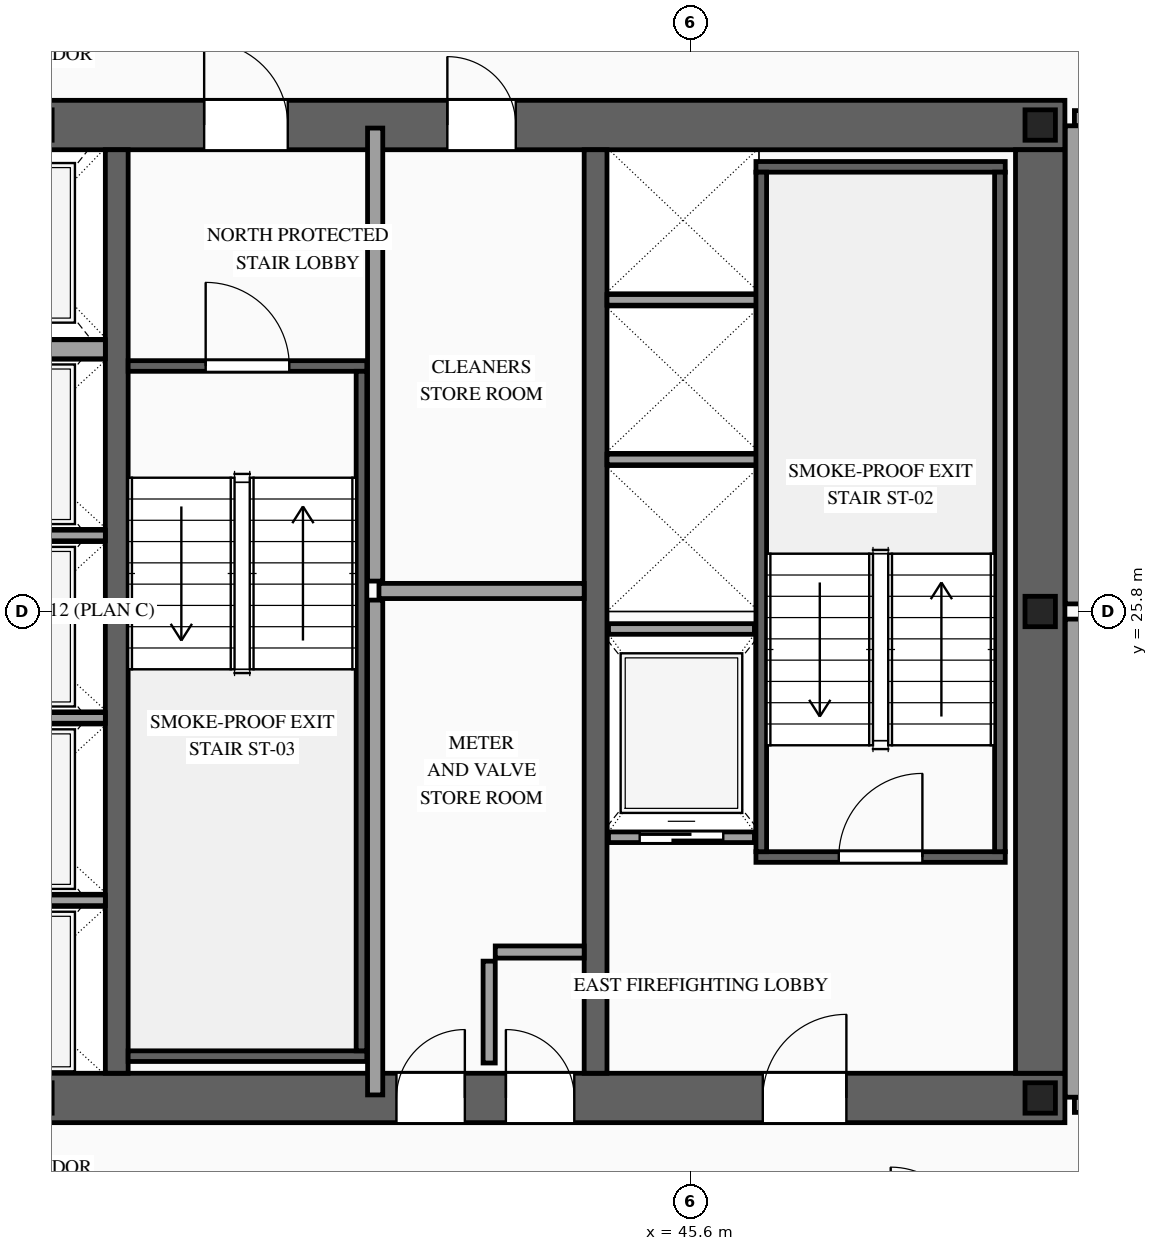
"""IFC4 building model, lengths in metres.
Left out: names, types, materials, properties, quantities, classifications, styles, units other than length and angle.
Written with IfcOpenShell. Run it as: python <this file> out.ifc"""

import sys

from ifc_helpers import new_model, si_unit, direction, frame, frame_2d, origin, origin_2d, place, context, subcontext, project, spatial, rectangle, i_section, extrude, source, transform, mapped, element, fill, save


model = new_model("IFC4")
c1 = context("Model", 3, precision=1e-05, world=origin(), true_north=direction((0.0, 1.0)))
c2 = subcontext(c1, "Body", "Model", "MODEL_VIEW")
j1 = project(units=[si_unit("LENGTHUNIT", "METRE"), si_unit("PLANEANGLEUNIT", "RADIAN")], contexts=[c1])
p1 = place(None, origin())
s1 = spatial("IfcSite", under=j1, at=p1, CompositionType="ELEMENT")
p2 = place(p1, origin())
s2 = spatial("IfcBuilding", under=s1, at=p2, CompositionType="ELEMENT")
p3 = place(p2, frame((0.0, 0.0, 212.5)))
s3 = spatial("IfcBuildingStorey", under=s2, at=p3, CompositionType="ELEMENT", Elevation=212.5)
p4 = place(p3, frame((23.475, 19.4, 0.0), z_axis=(0.0, 0.0, 1.0), x_axis=(1.0, 0.0, 0.0)))
e1 = element("IfcWall", 1, at=p4, inside=s3, PredefinedType="SHEAR", context=c2, shape_type="SweptSolid", body=[
    extrude(rectangle(XDim=27.05, YDim=0.65, at=frame_2d((13.525, 0.0))), origin(), (0.0, 0.0, 1.0), 3.5),
])
p5 = place(p4, frame((1.975, 0.0, 0.0)))
e2 = element("IfcOpeningElement", 2, at=p5, cuts=e1, PredefinedType="OPENING", context=c2, shape_type="SweptSolid", body=[
    extrude(rectangle(XDim=1.1, YDim=2.2, at=frame_2d((0.55, 1.1))), frame((0.0, 0.34, 0.0), z_axis=(0.0, -1.0, 0.0), x_axis=(1.0, 0.0, 0.0)), (0.0, 0.0, 1.0), 0.68),
])
p6 = place(p4, frame((9.875, 0.0, 0.0)))
e3 = element("IfcOpeningElement", 3, at=p6, cuts=e1, PredefinedType="OPENING", context=c2, shape_type="SweptSolid", body=[
    extrude(rectangle(XDim=1.1, YDim=2.2, at=frame_2d((0.55, 1.1))), frame((0.0, 0.34, 0.0), z_axis=(0.0, -1.0, 0.0), x_axis=(1.0, 0.0, 0.0)), (0.0, 0.0, 1.0), 0.68),
])
p7 = place(p4, frame((23.075, 0.0, 0.0)))
e4 = element("IfcOpeningElement", 4, at=p7, cuts=e1, PredefinedType="OPENING", context=c2, shape_type="SweptSolid", body=[
    extrude(rectangle(XDim=1.1, YDim=2.2, at=frame_2d((0.55, 1.1))), frame((0.0, 0.34, 0.0), z_axis=(0.0, -1.0, 0.0), x_axis=(1.0, 0.0, 0.0)), (0.0, 0.0, 1.0), 0.68),
])
p8 = place(p4, frame((19.695, 0.0, 0.0)))
e5 = element("IfcOpeningElement", 5, at=p8, cuts=e1, PredefinedType="OPENING", context=c2, shape_type="SweptSolid", body=[
    extrude(rectangle(XDim=0.9, YDim=2.15, at=frame_2d((0.45, 1.075))), frame((0.0, 0.34, 0.0), z_axis=(0.0, -1.0, 0.0), x_axis=(1.0, 0.0, 0.0)), (0.0, 0.0, 1.0), 0.68),
])
p9 = place(p4, frame((18.255, 0.0, 0.0)))
e6 = element("IfcOpeningElement", 6, at=p9, cuts=e1, PredefinedType="OPENING", context=c2, shape_type="SweptSolid", body=[
    extrude(rectangle(XDim=0.9, YDim=2.15, at=frame_2d((0.45, 1.075))), frame((0.0, 0.34, 0.0), z_axis=(0.0, -1.0, 0.0), x_axis=(1.0, 0.0, 0.0)), (0.0, 0.0, 1.0), 0.68),
])
p10 = place(p3, frame((23.475, 32.2, 0.0), z_axis=(0.0, 0.0, 1.0), x_axis=(1.0, 0.0, 0.0)))
e7 = element("IfcWall", 7, at=p10, inside=s3, PredefinedType="SHEAR", context=c2, shape_type="SweptSolid", body=[
    extrude(rectangle(XDim=27.05, YDim=0.65, at=frame_2d((13.525, 0.0))), origin(), (0.0, 0.0, 1.0), 3.5),
])
p11 = place(p10, frame((4.595, 0.0, 0.0)))
e8 = element("IfcOpeningElement", 8, at=p11, cuts=e7, PredefinedType="OPENING", context=c2, shape_type="SweptSolid", body=[
    extrude(rectangle(XDim=0.9, YDim=2.15, at=frame_2d((0.45, 1.075))), frame((0.0, 0.34, 0.0), z_axis=(0.0, -1.0, 0.0), x_axis=(1.0, 0.0, 0.0)), (0.0, 0.0, 1.0), 0.68),
])
p12 = place(p10, frame((9.875, 0.0, 0.0)))
e9 = element("IfcOpeningElement", 9, at=p12, cuts=e7, PredefinedType="OPENING", context=c2, shape_type="SweptSolid", body=[
    extrude(rectangle(XDim=1.1, YDim=2.2, at=frame_2d((0.55, 1.1))), frame((0.0, 0.34, 0.0), z_axis=(0.0, -1.0, 0.0), x_axis=(1.0, 0.0, 0.0)), (0.0, 0.0, 1.0), 0.68),
])
p13 = place(p10, frame((15.725, 0.0, 0.0)))
e10 = element("IfcOpeningElement", 10, at=p13, cuts=e7, PredefinedType="OPENING", context=c2, shape_type="SweptSolid", body=[
    extrude(rectangle(XDim=1.1, YDim=2.2, at=frame_2d((0.55, 1.1))), frame((0.0, 0.34, 0.0), z_axis=(0.0, -1.0, 0.0), x_axis=(1.0, 0.0, 0.0)), (0.0, 0.0, 1.0), 0.68),
])
p14 = place(p10, frame((18.925, 0.0, 0.0)))
e11 = element("IfcOpeningElement", 11, at=p14, cuts=e7, PredefinedType="OPENING", context=c2, shape_type="SweptSolid", body=[
    extrude(rectangle(XDim=0.9, YDim=2.15, at=frame_2d((0.45, 1.075))), frame((0.0, 0.34, 0.0), z_axis=(0.0, -1.0, 0.0), x_axis=(1.0, 0.0, 0.0)), (0.0, 0.0, 1.0), 0.68),
])
m1 = source(origin(), c2, "Body", "SweptSolid", [
    extrude(rectangle(XDim=12.15, YDim=0.65, at=frame_2d((6.075, 0.0))), origin(), (0.0, 0.0, 1.0), 3.5),
])
p15 = place(p3, frame((50.2, 19.725, 0.0), z_axis=(0.0, 0.0, 1.0), x_axis=(0.0, 1.0, 0.0)))
e12 = element("IfcWall", 12, at=p15, inside=s3, PredefinedType="SHEAR", context=c2, shape_type="MappedRepresentation", body=[
    mapped(m1, transform((0.0, 0.0, 0.0), scale=1.0)),
])
m2 = source(origin(), c2, "Body", "SweptSolid", [
    extrude(rectangle(XDim=12.15, YDim=0.3, at=frame_2d((6.075, 0.0))), origin(), (0.0, 0.0, 1.0), 3.5),
])
for number, where, z_axis, x_axis in (
    (13, (38.05, 19.725, 0.0), (0.0, 0.0, 1.0), (0.0, 1.0, 0.0)),
    (14, (44.35, 19.725, 0.0), (0.0, 0.0, 1.0), (0.0, 1.0, 0.0)),
):
    element("IfcWall", number, at=place(p3, frame(where, z_axis=z_axis, x_axis=x_axis)), inside=s3, PredefinedType="SOLIDWALL", context=c2, shape_type="MappedRepresentation", body=[
        mapped(m2, transform((0.0, 0.0, 0.0), scale=1.0)),
    ])
m3 = source(origin(), c2, "Body", "SweptSolid", [
    extrude(i_section(OverallWidth=0.4, OverallDepth=0.4, WebThickness=0.013, FlangeThickness=0.021, at=origin_2d()), origin(), (0.0, 0.0, 1.0), 3.5),
])
for number, where, z_axis, x_axis in (
    (15, (50.2, 19.4, 0.0), (0.0, 0.0, 1.0), (1.0, 0.0, 0.0)),
    (16, (50.2, 25.8, 0.0), (0.0, 0.0, 1.0), (1.0, 0.0, 0.0)),
    (17, (50.2, 32.2, 0.0), (0.0, 0.0, 1.0), (1.0, 0.0, 0.0)),
):
    element("IfcColumn", number, at=place(p3, frame(where, z_axis=z_axis, x_axis=x_axis)), inside=s3, PredefinedType="COLUMN", context=c2, shape_type="MappedRepresentation", body=[
        mapped(m3, transform((0.0, 0.0, 0.0), scale=1.0)),
    ])
p16 = place(p3, frame((44.52, 22.83, 0.0), z_axis=(0.0, 0.0, 1.0), x_axis=(1.0, 0.0, 0.0)))
e18 = element("IfcWall", 18, at=p16, inside=s3, PredefinedType="SOLIDWALL", context=c2, shape_type="SweptSolid", body=[
    extrude(rectangle(XDim=1.92, YDim=0.14, at=frame_2d((0.96, 0.0))), origin(), (0.0, 0.0, 1.0), 3.28),
])
p17 = place(p16, frame((0.41, 0.0, 0.0)))
e19 = element("IfcOpeningElement", 19, at=p17, cuts=e18, PredefinedType="OPENING", context=c2, shape_type="SweptSolid", body=[
    extrude(rectangle(XDim=1.1, YDim=2.2, at=frame_2d((0.55, 1.1))), frame((0.0, 0.085, 0.0), z_axis=(0.0, -1.0, 0.0), x_axis=(1.0, 0.0, 0.0)), (0.0, 0.0, 1.0), 0.17),
])
m4 = source(origin(), c2, "Body", "SweptSolid", [
    extrude(rectangle(XDim=1.92, YDim=0.14, at=frame_2d((0.96, 0.0))), origin(), (0.0, 0.0, 1.0), 3.28),
])
p18 = place(p3, frame((44.52, 25.57, 0.0), z_axis=(0.0, 0.0, 1.0), x_axis=(1.0, 0.0, 0.0)))
e20 = element("IfcWall", 20, at=p18, inside=s3, PredefinedType="SOLIDWALL", context=c2, shape_type="MappedRepresentation", body=[
    mapped(m4, transform((0.0, 0.0, 0.0), scale=1.0)),
])
m5 = source(origin(), c2, "Body", "SweptSolid", [
    extrude(rectangle(XDim=2.4, YDim=0.14, at=frame_2d((1.2, 0.0))), origin(), (0.0, 0.0, 1.0), 3.28),
])
for number, where, z_axis, x_axis in (
    (21, (35.5, 22.0, 0.0), (0.0, 0.0, 1.0), (1.0, 0.0, 0.0)),
    (22, (35.5, 24.4, 0.0), (0.0, 0.0, 1.0), (1.0, 0.0, 0.0)),
    (23, (35.5, 26.8, 0.0), (0.0, 0.0, 1.0), (1.0, 0.0, 0.0)),
):
    element("IfcWall", number, at=place(p3, frame(where, z_axis=z_axis, x_axis=x_axis)), inside=s3, PredefinedType="SOLIDWALL", context=c2, shape_type="MappedRepresentation", body=[
        mapped(m5, transform((0.0, 0.0, 0.0), scale=1.0)),
    ])
m6 = source(origin(), c2, "Body", "SweptSolid", [
    extrude(rectangle(XDim=2.4, YDim=0.25, at=frame_2d((1.2, 0.0))), origin(), (0.0, 0.0, 1.0), 3.28),
])
p19 = place(p3, frame((35.5, 29.25, 0.0), z_axis=(0.0, 0.0, 1.0), x_axis=(1.0, 0.0, 0.0)))
e24 = element("IfcWall", 24, at=p19, inside=s3, PredefinedType="SOLIDWALL", context=c2, shape_type="MappedRepresentation", body=[
    mapped(m6, transform((0.0, 0.0, 0.0), scale=1.0)),
])
m7 = source(origin(), c2, "Body", "SweptSolid", [
    extrude(rectangle(XDim=2.0, YDim=0.14, at=frame_2d((1.0, 0.0))), origin(), (0.0, 0.0, 1.0), 3.28),
])
for number, where, z_axis, x_axis in (
    (25, (44.5, 27.8, 0.0), (0.0, 0.0, 1.0), (1.0, 0.0, 0.0)),
    (26, (44.5, 29.9, 0.0), (0.0, 0.0, 1.0), (1.0, 0.0, 0.0)),
):
    element("IfcWall", number, at=place(p3, frame(where, z_axis=z_axis, x_axis=x_axis)), inside=s3, PredefinedType="SOLIDWALL", context=c2, shape_type="MappedRepresentation", body=[
        mapped(m7, transform((0.0, 0.0, 0.0), scale=1.0)),
    ])
p20 = place(p3, frame((46.46, 22.57, 0.0), z_axis=(0.0, 0.0, 1.0), x_axis=(1.0, 0.0, 0.0)))
e27 = element("IfcWall", 27, at=p20, inside=s3, PredefinedType="SOLIDWALL", context=c2, shape_type="SweptSolid", body=[
    extrude(rectangle(XDim=3.28, YDim=0.14, at=frame_2d((1.64, 0.0))), origin(), (0.0, 0.0, 1.0), 3.28),
])
p21 = place(p20, frame((1.09, 0.0, 0.0)))
e28 = element("IfcOpeningElement", 28, at=p21, cuts=e27, PredefinedType="OPENING", context=c2, shape_type="SweptSolid", body=[
    extrude(rectangle(XDim=1.1, YDim=2.2, at=frame_2d((0.55, 1.1))), frame((0.0, 0.085, 0.0), z_axis=(0.0, -1.0, 0.0), x_axis=(1.0, 0.0, 0.0)), (0.0, 0.0, 1.0), 0.17),
])
m8 = source(origin(), c2, "Body", "SweptSolid", [
    extrude(rectangle(XDim=3.28, YDim=0.14, at=frame_2d((1.64, 0.0))), origin(), (0.0, 0.0, 1.0), 3.28),
])
p22 = place(p3, frame((46.46, 31.65, 0.0), z_axis=(0.0, 0.0, 1.0), x_axis=(1.0, 0.0, 0.0)))
e29 = element("IfcWall", 29, at=p22, inside=s3, PredefinedType="SOLIDWALL", context=c2, shape_type="MappedRepresentation", body=[
    mapped(m8, transform((0.0, 0.0, 0.0), scale=1.0)),
])
m9 = source(origin(), c2, "Body", "SweptSolid", [
    extrude(rectangle(XDim=8.94, YDim=0.14, at=frame_2d((4.47, 0.0))), origin(), (0.0, 0.0, 1.0), 3.28),
])
for number, where, z_axis, x_axis in (
    (30, (46.53, 22.64, 0.0), (0.0, 0.0, 1.0), (0.0, 1.0, 0.0)),
    (31, (49.67, 22.64, 0.0), (0.0, 0.0, 1.0), (0.0, 1.0, 0.0)),
):
    element("IfcWall", number, at=place(p3, frame(where, z_axis=z_axis, x_axis=x_axis)), inside=s3, PredefinedType="SOLIDWALL", context=c2, shape_type="MappedRepresentation", body=[
        mapped(m9, transform((0.0, 0.0, 0.0), scale=1.0)),
    ])
p23 = place(p3, frame((38.2, 29.03, 0.0), z_axis=(0.0, 0.0, 1.0), x_axis=(1.0, 0.0, 0.0)))
e32 = element("IfcWall", 32, at=p23, inside=s3, PredefinedType="SOLIDWALL", context=c2, shape_type="SweptSolid", body=[
    extrude(rectangle(XDim=3.14, YDim=0.14, at=frame_2d((1.57, 0.0))), origin(), (0.0, 0.0, 1.0), 3.28),
])
p24 = place(p23, frame((1.02, 0.0, 0.0)))
e33 = element("IfcOpeningElement", 33, at=p24, cuts=e32, PredefinedType="OPENING", context=c2, shape_type="SweptSolid", body=[
    extrude(rectangle(XDim=1.1, YDim=2.2, at=frame_2d((0.55, 1.1))), frame((0.0, 0.085, 0.0), z_axis=(0.0, -1.0, 0.0), x_axis=(1.0, 0.0, 0.0)), (0.0, 0.0, 1.0), 0.17),
])
m10 = source(origin(), c2, "Body", "SweptSolid", [
    extrude(rectangle(XDim=3.14, YDim=0.14, at=frame_2d((1.57, 0.0))), origin(), (0.0, 0.0, 1.0), 3.28),
])
p25 = place(p3, frame((38.2, 19.95, 0.0), z_axis=(0.0, 0.0, 1.0), x_axis=(1.0, 0.0, 0.0)))
e34 = element("IfcWall", 34, at=p25, inside=s3, PredefinedType="SOLIDWALL", context=c2, shape_type="MappedRepresentation", body=[
    mapped(m10, transform((0.0, 0.0, 0.0), scale=1.0)),
])
m11 = source(origin(), c2, "Body", "SweptSolid", [
    extrude(rectangle(XDim=8.94, YDim=0.14, at=frame_2d((4.47, 0.0))), origin(), (0.0, 0.0, 1.0), 3.28),
])
p26 = place(p3, frame((41.27, 20.02, 0.0), z_axis=(0.0, 0.0, 1.0), x_axis=(0.0, 1.0, 0.0)))
e35 = element("IfcWall", 35, at=p26, inside=s3, PredefinedType="SOLIDWALL", context=c2, shape_type="MappedRepresentation", body=[
    mapped(m11, transform((0.0, 0.0, 0.0), scale=1.0)),
])
m12 = source(origin(), c2, "Body", "SweptSolid", [
    extrude(rectangle(XDim=1.34, YDim=0.16, at=frame_2d((0.67, 0.0))), origin(), (0.0, 0.0, 1.0), 3.28),
])
p27 = place(p3, frame((42.95, 19.86, 0.0), z_axis=(0.0, 0.0, 1.0), x_axis=(0.0, 1.0, 0.0)))
e36 = element("IfcWall", 36, at=p27, inside=s3, PredefinedType="PARTITIONING", context=c2, shape_type="MappedRepresentation", body=[
    mapped(m12, transform((0.0, 0.0, 0.0), scale=1.0)),
])
m13 = source(origin(), c2, "Body", "SweptSolid", [
    extrude(rectangle(XDim=1.17, YDim=0.16, at=frame_2d((0.585, 0.0))), origin(), (0.0, 0.0, 1.0), 3.28),
])
p28 = place(p3, frame((43.03, 21.32, 0.0), z_axis=(0.0, 0.0, 1.0), x_axis=(1.0, 0.0, 0.0)))
e37 = element("IfcWall", 37, at=p28, inside=s3, PredefinedType="PARTITIONING", context=c2, shape_type="MappedRepresentation", body=[
    mapped(m13, transform((0.0, 0.0, 0.0), scale=1.0)),
])
m14 = source(origin(), c2, "Body", "SweptSolid", [
    extrude(rectangle(XDim=6.51, YDim=0.2, at=frame_2d((3.255, 0.0))), origin(), (0.0, 0.0, 1.0), 3.28),
])
p29 = place(p3, frame((41.45, 19.44, 0.0), z_axis=(0.0, 0.0, 1.0), x_axis=(0.0, 1.0, 0.0)))
e38 = element("IfcWall", 38, at=p29, inside=s3, PredefinedType="PARTITIONING", context=c2, shape_type="MappedRepresentation", body=[
    mapped(m14, transform((0.0, 0.0, 0.0), scale=1.0)),
])
m15 = source(origin(), c2, "Body", "SweptSolid", [
    extrude(rectangle(XDim=2.7, YDim=0.2, at=frame_2d((1.35, 0.0))), origin(), (0.0, 0.0, 1.0), 3.28),
])
p30 = place(p3, frame((41.5, 26.07, 0.0), z_axis=(0.0, 0.0, 1.0), x_axis=(1.0, 0.0, 0.0)))
e39 = element("IfcWall", 39, at=p30, inside=s3, PredefinedType="PARTITIONING", context=c2, shape_type="MappedRepresentation", body=[
    mapped(m15, transform((0.0, 0.0, 0.0), scale=1.0)),
])
m16 = source(origin(), c2, "Body", "SweptSolid", [
    extrude(rectangle(XDim=5.96, YDim=0.2, at=frame_2d((2.98, 0.0))), origin(), (0.0, 0.0, 1.0), 3.28),
])
p31 = place(p3, frame((41.45, 26.2, 0.0), z_axis=(0.0, 0.0, 1.0), x_axis=(0.0, 1.0, 0.0)))
e40 = element("IfcWall", 40, at=p31, inside=s3, PredefinedType="PARTITIONING", context=c2, shape_type="MappedRepresentation", body=[
    mapped(m16, transform((0.0, 0.0, 0.0), scale=1.0)),
])
p32 = place(p3, frame((50.65, 19.31, 0.0), z_axis=(0.0, 0.0, 1.0), x_axis=(1.0, 0.0, 0.0)))
e41 = element("IfcWall", 41, at=p32, inside=s3, PredefinedType="PARTITIONING", context=c2, shape_type="SweptSolid", body=[
    extrude(rectangle(XDim=8.3, YDim=0.2, at=frame_2d((4.15, 0.0))), origin(), (0.0, 0.0, 1.0), 2.775),
])
p33 = place(p32, frame((3.585, 0.0, 0.0)))
e42 = element("IfcOpeningElement", 42, at=p33, cuts=e41, PredefinedType="OPENING", context=c2, shape_type="SweptSolid", body=[
    extrude(rectangle(XDim=1.0, YDim=2.2, at=frame_2d((0.5, 1.1))), frame((0.0, 0.115, 0.0), z_axis=(0.0, -1.0, 0.0), x_axis=(1.0, 0.0, 0.0)), (0.0, 0.0, 1.0), 0.23),
])
m17 = source(origin(), c2, "Body", "SweptSolid", [
    extrude(rectangle(XDim=6.29, YDim=0.2, at=frame_2d((3.145, 0.0))), origin(), (0.0, 0.0, 1.0), 3.28),
])
p34 = place(p3, frame((50.63, 19.41, 0.0), z_axis=(0.0, 0.0, 1.0), x_axis=(0.0, 1.0, 0.0)))
e43 = element("IfcWall", 43, at=p34, inside=s3, PredefinedType="PARTITIONING", context=c2, shape_type="MappedRepresentation", body=[
    mapped(m17, transform((0.0, 0.0, 0.0), scale=1.0)),
])
p35 = place(p3, frame((50.65, 32.29, 0.0), z_axis=(0.0, 0.0, 1.0), x_axis=(1.0, 0.0, 0.0)))
e44 = element("IfcWall", 44, at=p35, inside=s3, PredefinedType="PARTITIONING", context=c2, shape_type="SweptSolid", body=[
    extrude(rectangle(XDim=8.3, YDim=0.2, at=frame_2d((4.15, 0.0))), origin(), (0.0, 0.0, 1.0), 2.775),
])
p36 = place(p35, frame((3.585, 0.0, 0.0)))
e45 = element("IfcOpeningElement", 45, at=p36, cuts=e44, PredefinedType="OPENING", context=c2, shape_type="SweptSolid", body=[
    extrude(rectangle(XDim=1.0, YDim=2.2, at=frame_2d((0.5, 1.1))), frame((0.0, 0.115, 0.0), z_axis=(0.0, -1.0, 0.0), x_axis=(1.0, 0.0, 0.0)), (0.0, 0.0, 1.0), 0.23),
])
p37 = place(p3, frame((50.63, 25.9, 0.0), z_axis=(0.0, 0.0, 1.0), x_axis=(0.0, 1.0, 0.0)))
e46 = element("IfcWall", 46, at=p37, inside=s3, PredefinedType="PARTITIONING", context=c2, shape_type="MappedRepresentation", body=[
    mapped(m17, transform((0.0, 0.0, 0.0), scale=1.0)),
])
m18 = source(origin(), c2, "Body", "SweptSolid", [
    extrude(rectangle(XDim=1.1, YDim=2.2, at=frame_2d((0.55, 1.1))), frame((0.0, 0.025, 0.0), z_axis=(0.0, -1.0, 0.0), x_axis=(1.0, 0.0, 0.0)), (0.0, 0.0, 1.0), 0.05),
])
p38 = place(p17, origin())
e47 = element("IfcDoor", 47, at=p38, inside=s3, OperationType="SLIDING_TO_RIGHT", PredefinedType="DOOR", context=c2, shape_type="MappedRepresentation", body=[
    mapped(m18, transform((0.0, 0.0, 0.0), scale=1.0)),
])
fill(e19, e47)
m19 = source(origin(), c2, "Body", "SweptSolid", [
    extrude(rectangle(XDim=1.1, YDim=2.2, at=frame_2d((0.55, 1.1))), frame((0.0, 0.025, 0.0), z_axis=(0.0, -1.0, 0.0), x_axis=(1.0, 0.0, 0.0)), (0.0, 0.0, 1.0), 0.05),
])
p39 = place(p21, origin())
e48 = element("IfcDoor", 48, at=p39, inside=s3, OperationType="SINGLE_SWING_RIGHT", PredefinedType="DOOR", context=c2, shape_type="MappedRepresentation", body=[
    mapped(m19, transform((0.0, 0.0, 0.0), scale=1.0)),
])
fill(e28, e48)
p40 = place(p24, origin())
e49 = element("IfcDoor", 49, at=p40, inside=s3, OperationType="SINGLE_SWING_LEFT", PredefinedType="DOOR", context=c2, shape_type="MappedRepresentation", body=[
    mapped(m19, transform((0.0, 0.0, 0.0), scale=1.0)),
])
fill(e33, e49)
p41 = place(p7, origin())
e50 = element("IfcDoor", 50, at=p41, inside=s3, OperationType="SINGLE_SWING_RIGHT", PredefinedType="DOOR", context=c2, shape_type="MappedRepresentation", body=[
    mapped(m19, transform((0.0, 0.0, 0.0), scale=1.0)),
])
fill(e4, e50)
p42 = place(p13, origin())
e51 = element("IfcDoor", 51, at=p42, inside=s3, OperationType="SINGLE_SWING_LEFT", PredefinedType="DOOR", context=c2, shape_type="MappedRepresentation", body=[
    mapped(m19, transform((0.0, 0.0, 0.0), scale=1.0)),
])
fill(e10, e51)
m20 = source(origin(), c2, "Body", "SweptSolid", [
    extrude(rectangle(XDim=0.9, YDim=2.15, at=frame_2d((0.45, 1.075))), frame((0.0, 0.025, 0.0), z_axis=(0.0, -1.0, 0.0), x_axis=(1.0, 0.0, 0.0)), (0.0, 0.0, 1.0), 0.05),
])
p43 = place(p8, origin())
e52 = element("IfcDoor", 52, at=p43, inside=s3, OperationType="SINGLE_SWING_LEFT", PredefinedType="DOOR", context=c2, shape_type="MappedRepresentation", body=[
    mapped(m20, transform((0.0, 0.0, 0.0), scale=1.0)),
])
fill(e5, e52)
p44 = place(p9, origin())
e53 = element("IfcDoor", 53, at=p44, inside=s3, OperationType="SINGLE_SWING_RIGHT", PredefinedType="DOOR", context=c2, shape_type="MappedRepresentation", body=[
    mapped(m20, transform((0.0, 0.0, 0.0), scale=1.0)),
])
fill(e6, e53)
p45 = place(p14, origin())
e54 = element("IfcDoor", 54, at=p45, inside=s3, OperationType="SINGLE_SWING_LEFT", PredefinedType="DOOR", context=c2, shape_type="MappedRepresentation", body=[
    mapped(m20, transform((0.0, 0.0, 0.0), scale=1.0)),
])
fill(e11, e54)
save(model, sys.argv[1])
